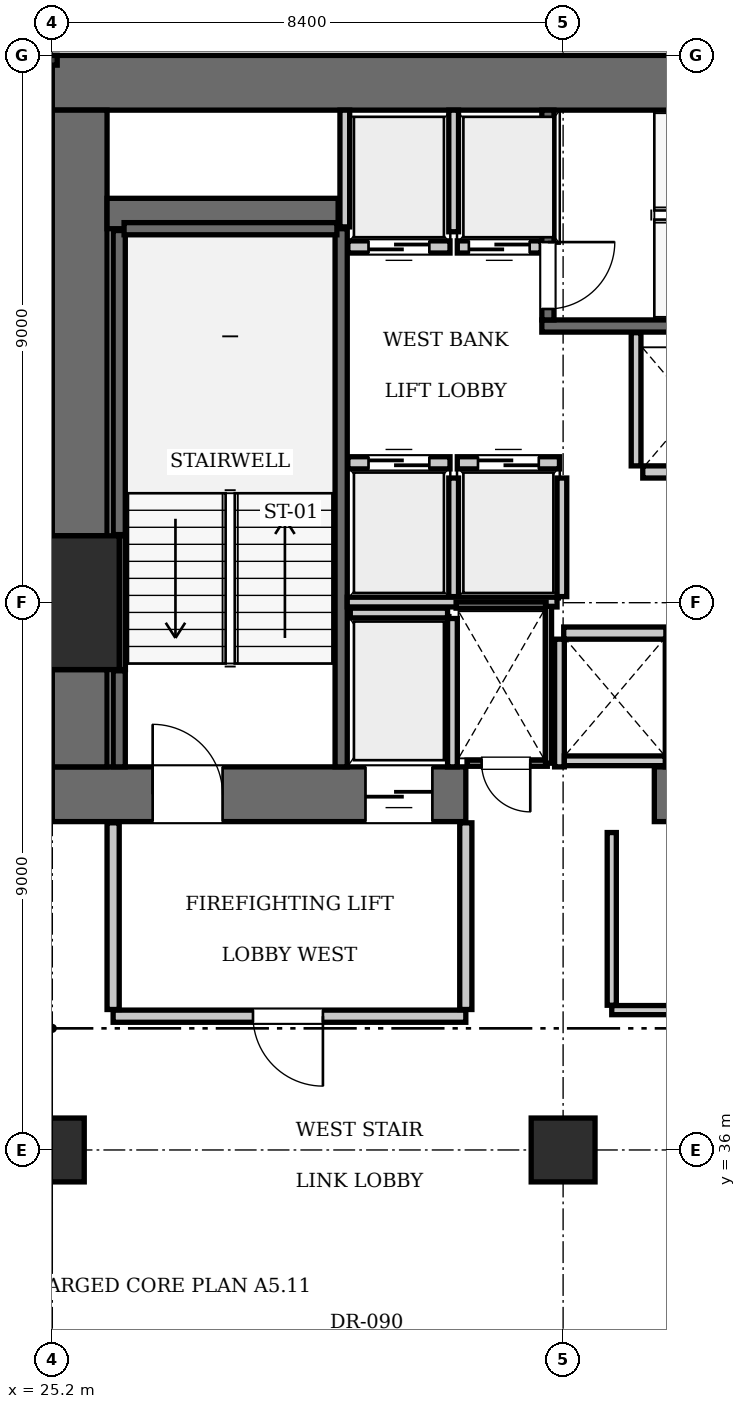
"""IFC4 building model, lengths in metres.
Left out: names, types, materials, properties, quantities, classifications, styles, units other than length and angle.
Written with IfcOpenShell. Run it as: python <this file> out.ifc"""

import sys

from ifc_helpers import new_model, si_unit, direction, frame, frame_2d, origin, origin_2d, place, context, subcontext, project, spatial, rectangle, extrude, element, fill, save


model = new_model("IFC4")
c1 = context("Model", 3, precision=1e-05, world=origin(), true_north=direction((0.0, 1.0)))
c2 = subcontext(c1, "Body", "Model", "MODEL_VIEW")
j1 = project(units=[si_unit("LENGTHUNIT", "METRE"), si_unit("PLANEANGLEUNIT", "RADIAN")], contexts=[c1])
p1 = place(None, origin())
s1 = spatial("IfcSite", under=j1, at=p1, CompositionType="ELEMENT")
p2 = place(p1, origin())
s2 = spatial("IfcBuilding", under=s1, at=p2, CompositionType="ELEMENT")
p3 = place(p2, frame((0.0, 0.0, 38.5)))
s3 = spatial("IfcBuildingStorey", under=s2, at=p3, CompositionType="ELEMENT", Elevation=38.5)
p4 = place(p3, frame((25.2, 45.0, 0.0), z_axis=(0.0, 0.0, 1.0), x_axis=(1.0, 0.0, 0.0)))
e1 = element("IfcColumn", 1, at=p4, inside=s3, PredefinedType="COLUMN", context=c2, shape_type="SweptSolid", body=[
    extrude(rectangle(XDim=2.2, YDim=2.2, at=origin_2d()), origin(), (0.0, 0.0, 1.0), 3.85),
])
p5 = place(p3, frame((25.2, 53.55, 0.0), z_axis=(0.0, 0.0, 1.0), x_axis=(1.0, 0.0, 0.0)))
e2 = element("IfcWall", 2, at=p5, inside=s3, PredefinedType="SHEAR", context=c2, shape_type="SweptSolid", body=[
    extrude(rectangle(XDim=25.2, YDim=0.9, at=frame_2d((12.6, 0.0))), origin(), (0.0, 0.0, 1.0), 3.85),
])
p6 = place(p3, frame((25.2, 41.85, 0.0), z_axis=(0.0, 0.0, 1.0), x_axis=(1.0, 0.0, 0.0)))
e3 = element("IfcWall", 3, at=p6, inside=s3, PredefinedType="SHEAR", context=c2, shape_type="SweptSolid", body=[
    extrude(rectangle(XDim=6.8, YDim=0.9, at=frame_2d((3.4, 0.0))), origin(), (0.0, 0.0, 1.0), 3.85),
])
p7 = place(p6, frame((1.65, 0.0, 0.0)))
e4 = element("IfcOpeningElement", 4, at=p7, cuts=e3, PredefinedType="OPENING", context=c2, shape_type="SweptSolid", body=[
    extrude(rectangle(XDim=1.15, YDim=2.15, at=frame_2d((0.575, 1.075))), frame((0.0, 0.46, 0.0), z_axis=(0.0, -1.0, 0.0), x_axis=(1.0, 0.0, 0.0)), (0.0, 0.0, 1.0), 0.92),
])
p8 = place(p6, frame((5.15, 0.0, 0.0)))
e5 = element("IfcOpeningElement", 5, at=p8, cuts=e3, PredefinedType="OPENING", context=c2, shape_type="SweptSolid", body=[
    extrude(rectangle(XDim=1.1, YDim=2.2, at=frame_2d((0.55, 1.1))), frame((0.0, 0.46, 0.0), z_axis=(0.0, -1.0, 0.0), x_axis=(1.0, 0.0, 0.0)), (0.0, 0.0, 1.0), 0.92),
])
p9 = place(p3, frame((35.1, 41.85, 0.0), z_axis=(0.0, 0.0, 1.0), x_axis=(1.0, 0.0, 0.0)))
e6 = element("IfcWall", 6, at=p9, inside=s3, PredefinedType="SHEAR", context=c2, shape_type="SweptSolid", body=[
    extrude(rectangle(XDim=5.4, YDim=0.9, at=frame_2d((2.7, 0.0))), origin(), (0.0, 0.0, 1.0), 3.85),
])
p10 = place(p3, frame((25.65, 42.3, 0.0), z_axis=(0.0, 0.0, 1.0), x_axis=(0.0, 1.0, 0.0)))
e7 = element("IfcWall", 7, at=p10, inside=s3, PredefinedType="SHEAR", context=c2, shape_type="SweptSolid", body=[
    extrude(rectangle(XDim=1.6, YDim=0.9, at=frame_2d((0.8, 0.0))), origin(), (0.0, 0.0, 1.0), 3.85),
])
p11 = place(p3, frame((25.65, 46.1, 0.0), z_axis=(0.0, 0.0, 1.0), x_axis=(0.0, 1.0, 0.0)))
e8 = element("IfcWall", 8, at=p11, inside=s3, PredefinedType="SHEAR", context=c2, shape_type="SweptSolid", body=[
    extrude(rectangle(XDim=7.0, YDim=0.9, at=frame_2d((3.5, 0.0))), origin(), (0.0, 0.0, 1.0), 3.85),
])
p12 = place(p3, frame((26.1, 51.4, 0.0), z_axis=(0.0, 0.0, 1.0), x_axis=(1.0, 0.0, 0.0)))
e9 = element("IfcWall", 9, at=p12, inside=s3, PredefinedType="SHEAR", context=c2, shape_type="SweptSolid", body=[
    extrude(rectangle(XDim=3.8, YDim=0.5, at=frame_2d((1.9, 0.0))), origin(), (0.0, 0.0, 1.0), 3.85),
])
for number, where, z_axis, x_axis in (
    (10, (25.2, 36.0, 0.0), (0.0, 0.0, 1.0), (1.0, 0.0, 0.0)),
    (11, (33.6, 36.0, 0.0), (0.0, 0.0, 1.0), (1.0, 0.0, 0.0)),
):
    element("IfcColumn", number, at=place(p3, frame(where, z_axis=z_axis, x_axis=x_axis)), inside=s3, PredefinedType="COLUMN", context=c2, shape_type="SweptSolid", body=[
        extrude(rectangle(XDim=1.05, YDim=1.05, at=origin_2d()), origin(), (0.0, 0.0, 1.0), 3.85),
    ])
p13 = place(p3, frame((29.95, 42.3, 0.0), z_axis=(0.0, 0.0, 1.0), x_axis=(0.0, 1.0, 0.0)))
e12 = element("IfcWall", 12, at=p13, inside=s3, PredefinedType="SOLIDWALL", context=c2, shape_type="SweptSolid", body=[
    extrude(rectangle(XDim=8.85, YDim=0.2, at=frame_2d((4.425, 0.0))), origin(), (0.0, 0.0, 1.0), 3.61),
])
p14 = place(p3, frame((26.3, 42.3, 0.0), z_axis=(0.0, 0.0, 1.0), x_axis=(0.0, 1.0, 0.0)))
e13 = element("IfcWall", 13, at=p14, inside=s3, PredefinedType="SOLIDWALL", context=c2, shape_type="SweptSolid", body=[
    extrude(rectangle(XDim=1.58, YDim=0.2, at=frame_2d((0.79, 0.0))), origin(), (0.0, 0.0, 1.0), 3.61),
])
p15 = place(p3, frame((26.3, 46.12, 0.0), z_axis=(0.0, 0.0, 1.0), x_axis=(0.0, 1.0, 0.0)))
e14 = element("IfcWall", 14, at=p15, inside=s3, PredefinedType="SOLIDWALL", context=c2, shape_type="SweptSolid", body=[
    extrude(rectangle(XDim=5.0, YDim=0.2, at=frame_2d((2.5, 0.0))), origin(), (0.0, 0.0, 1.0), 3.61),
])
p16 = place(p3, frame((26.38, 51.15, 0.0), z_axis=(0.0, 0.0, 1.0), x_axis=(1.0, 0.0, 0.0)))
e15 = element("IfcWall", 15, at=p16, inside=s3, PredefinedType="SOLIDWALL", context=c2, shape_type="SweptSolid", body=[
    extrude(rectangle(XDim=3.5, YDim=0.2, at=frame_2d((1.75, 0.0))), origin(), (0.0, 0.0, 1.0), 3.61),
])
p17 = place(p3, frame((26.352, 43.9, 0.0), z_axis=(0.0, 0.0, 1.0), x_axis=(0.0, 1.0, 0.0)))
e16 = element("IfcWall", 16, at=p17, inside=s3, PredefinedType="SOLIDWALL", context=c2, shape_type="SweptSolid", body=[
    extrude(rectangle(XDim=2.2, YDim=0.1, at=frame_2d((1.1, 0.0))), origin(), (0.0, 0.0, 1.0), 3.61),
])
p18 = place(p3, frame((33.25, 49.55, 0.0), z_axis=(0.0, 0.0, 1.0), x_axis=(1.0, 0.0, 0.0)))
e17 = element("IfcWall", 17, at=p18, inside=s3, PredefinedType="SOLIDWALL", context=c2, shape_type="SweptSolid", body=[
    extrude(rectangle(XDim=9.1, YDim=0.2, at=frame_2d((4.55, 0.0))), origin(), (0.0, 0.0, 1.0), 3.61),
])
p19 = place(p3, frame((33.35, 49.65, 0.0), z_axis=(0.0, 0.0, 1.0), x_axis=(0.0, 1.0, 0.0)))
e18 = element("IfcWall", 18, at=p19, inside=s3, PredefinedType="SOLIDWALL", context=c2, shape_type="SweptSolid", body=[
    extrude(rectangle(XDim=3.45, YDim=0.2, at=frame_2d((1.725, 0.0))), origin(), (0.0, 0.0, 1.0), 3.61),
])
p20 = place(p19, frame((0.18, 0.0, 0.0)))
e19 = element("IfcOpeningElement", 19, at=p20, cuts=e18, PredefinedType="OPENING", context=c2, shape_type="SweptSolid", body=[
    extrude(rectangle(XDim=1.1, YDim=2.15, at=frame_2d((0.55, 1.075))), frame((0.0, 0.11, 0.0), z_axis=(0.0, -1.0, 0.0), x_axis=(1.0, 0.0, 0.0)), (0.0, 0.0, 1.0), 0.22),
])
p21 = place(p3, frame((30.06, 47.3, 0.0), z_axis=(0.0, 0.0, 1.0), x_axis=(1.0, 0.0, 0.0)))
e20 = element("IfcWall", 20, at=p21, inside=s3, PredefinedType="SOLIDWALL", context=c2, shape_type="SweptSolid", body=[
    extrude(rectangle(XDim=1.68, YDim=0.2, at=frame_2d((0.84, 0.0))), origin(), (0.0, 0.0, 1.0), 3.61),
])
p22 = place(p21, frame((0.34, 0.0, 0.0)))
e21 = element("IfcOpeningElement", 21, at=p22, cuts=e20, PredefinedType="OPENING", context=c2, shape_type="SweptSolid", body=[
    extrude(rectangle(XDim=1.0, YDim=2.15, at=frame_2d((0.5, 1.075))), frame((0.0, 0.11, 0.0), z_axis=(0.0, -1.0, 0.0), x_axis=(1.0, 0.0, 0.0)), (0.0, 0.0, 1.0), 0.22),
])
p23 = place(p3, frame((31.86, 47.3, 0.0), z_axis=(0.0, 0.0, 1.0), x_axis=(1.0, 0.0, 0.0)))
e22 = element("IfcWall", 22, at=p23, inside=s3, PredefinedType="SOLIDWALL", context=c2, shape_type="SweptSolid", body=[
    extrude(rectangle(XDim=1.68, YDim=0.2, at=frame_2d((0.84, 0.0))), origin(), (0.0, 0.0, 1.0), 3.61),
])
p24 = place(p23, frame((0.34, 0.0, 0.0)))
e23 = element("IfcOpeningElement", 23, at=p24, cuts=e22, PredefinedType="OPENING", context=c2, shape_type="SweptSolid", body=[
    extrude(rectangle(XDim=1.0, YDim=2.15, at=frame_2d((0.5, 1.075))), frame((0.0, 0.11, 0.0), z_axis=(0.0, -1.0, 0.0), x_axis=(1.0, 0.0, 0.0)), (0.0, 0.0, 1.0), 0.22),
])
p25 = place(p3, frame((30.06, 50.85, 0.0), z_axis=(0.0, 0.0, 1.0), x_axis=(1.0, 0.0, 0.0)))
e24 = element("IfcWall", 24, at=p25, inside=s3, PredefinedType="SOLIDWALL", context=c2, shape_type="SweptSolid", body=[
    extrude(rectangle(XDim=1.68, YDim=0.2, at=frame_2d((0.84, 0.0))), origin(), (0.0, 0.0, 1.0), 3.61),
])
p26 = place(p25, frame((0.34, 0.0, 0.0)))
e25 = element("IfcOpeningElement", 25, at=p26, cuts=e24, PredefinedType="OPENING", context=c2, shape_type="SweptSolid", body=[
    extrude(rectangle(XDim=1.0, YDim=2.15, at=frame_2d((0.5, 1.075))), frame((0.0, 0.11, 0.0), z_axis=(0.0, -1.0, 0.0), x_axis=(1.0, 0.0, 0.0)), (0.0, 0.0, 1.0), 0.22),
])
p27 = place(p3, frame((31.86, 50.85, 0.0), z_axis=(0.0, 0.0, 1.0), x_axis=(1.0, 0.0, 0.0)))
e26 = element("IfcWall", 26, at=p27, inside=s3, PredefinedType="SOLIDWALL", context=c2, shape_type="SweptSolid", body=[
    extrude(rectangle(XDim=1.38, YDim=0.2, at=frame_2d((0.69, 0.0))), origin(), (0.0, 0.0, 1.0), 3.61),
])
p28 = place(p27, frame((0.19, 0.0, 0.0)))
e27 = element("IfcOpeningElement", 27, at=p28, cuts=e26, PredefinedType="OPENING", context=c2, shape_type="SweptSolid", body=[
    extrude(rectangle(XDim=1.0, YDim=2.15, at=frame_2d((0.5, 1.075))), frame((0.0, 0.11, 0.0), z_axis=(0.0, -1.0, 0.0), x_axis=(1.0, 0.0, 0.0)), (0.0, 0.0, 1.0), 0.22),
])
p29 = place(p3, frame((34.91, 47.15, 0.0), z_axis=(0.0, 0.0, 1.0), x_axis=(1.0, 0.0, 0.0)))
e28 = element("IfcWall", 28, at=p29, inside=s3, PredefinedType="SOLIDWALL", context=c2, shape_type="SweptSolid", body=[
    extrude(rectangle(XDim=1.68, YDim=0.2, at=frame_2d((0.84, 0.0))), origin(), (0.0, 0.0, 1.0), 3.61),
])
p30 = place(p3, frame((33.61, 44.5, 0.0), z_axis=(0.0, 0.0, 1.0), x_axis=(1.0, 0.0, 0.0)))
e29 = element("IfcWall", 29, at=p30, inside=s3, PredefinedType="SOLIDWALL", context=c2, shape_type="SweptSolid", body=[
    extrude(rectangle(XDim=1.68, YDim=0.2, at=frame_2d((0.84, 0.0))), origin(), (0.0, 0.0, 1.0), 3.61),
])
p31 = place(p3, frame((30.1, 44.83, 0.0), z_axis=(0.0, 0.0, 1.0), x_axis=(1.0, 0.0, 0.0)))
e30 = element("IfcWall", 30, at=p31, inside=s3, PredefinedType="SOLIDWALL", context=c2, shape_type="SweptSolid", body=[
    extrude(rectangle(XDim=1.6, YDim=0.16, at=frame_2d((0.8, 0.0))), origin(), (0.0, 0.0, 1.0), 3.61),
])
p32 = place(p3, frame((31.78, 42.3, 0.0), z_axis=(0.0, 0.0, 1.0), x_axis=(0.0, 1.0, 0.0)))
e31 = element("IfcWall", 31, at=p32, inside=s3, PredefinedType="SOLIDWALL", context=c2, shape_type="SweptSolid", body=[
    extrude(rectangle(XDim=2.44, YDim=0.16, at=frame_2d((1.22, 0.0))), origin(), (0.0, 0.0, 1.0), 3.61),
])
for number, where, z_axis, x_axis in (
    (32, (31.8, 45.1, 0.0), (0.0, 0.0, 1.0), (0.0, 1.0, 0.0)),
    (33, (33.58, 45.1, 0.0), (0.0, 0.0, 1.0), (0.0, 1.0, 0.0)),
):
    element("IfcWall", number, at=place(p3, frame(where, z_axis=z_axis, x_axis=x_axis)), inside=s3, PredefinedType="SOLIDWALL", context=c2, shape_type="SweptSolid", body=[
        extrude(rectangle(XDim=1.95, YDim=0.16, at=frame_2d((0.975, 0.0))), origin(), (0.0, 0.0, 1.0), 3.61),
    ])
p33 = place(p3, frame((30.05, 45.01, 0.0), z_axis=(0.0, 0.0, 1.0), x_axis=(1.0, 0.0, 0.0)))
e34 = element("IfcWall", 34, at=p33, inside=s3, PredefinedType="SOLIDWALL", context=c2, shape_type="SweptSolid", body=[
    extrude(rectangle(XDim=3.45, YDim=0.16, at=frame_2d((1.725, 0.0))), origin(), (0.0, 0.0, 1.0), 3.61),
])
p34 = place(p3, frame((30.01, 51.18, 0.0), z_axis=(0.0, 0.0, 1.0), x_axis=(0.0, 1.0, 0.0)))
e35 = element("IfcWall", 35, at=p34, inside=s3, PredefinedType="SOLIDWALL", context=c2, shape_type="SweptSolid", body=[
    extrude(rectangle(XDim=1.92, YDim=0.16, at=frame_2d((0.96, 0.0))), origin(), (0.0, 0.0, 1.0), 3.61),
])
p35 = place(p3, frame((31.8, 51.1, 0.0), z_axis=(0.0, 0.0, 1.0), x_axis=(0.0, 1.0, 0.0)))
e36 = element("IfcWall", 36, at=p35, inside=s3, PredefinedType="SOLIDWALL", context=c2, shape_type="SweptSolid", body=[
    extrude(rectangle(XDim=2.0, YDim=0.16, at=frame_2d((1.0, 0.0))), origin(), (0.0, 0.0, 1.0), 3.61),
])
p36 = place(p3, frame((34.8, 47.25, 0.0), z_axis=(0.0, 0.0, 1.0), x_axis=(0.0, 1.0, 0.0)))
e37 = element("IfcWall", 37, at=p36, inside=s3, PredefinedType="SOLIDWALL", context=c2, shape_type="SweptSolid", body=[
    extrude(rectangle(XDim=2.19, YDim=0.16, at=frame_2d((1.095, 0.0))), origin(), (0.0, 0.0, 1.0), 3.61),
])
for number, where, z_axis, x_axis in (
    (38, (33.54, 42.3, 0.0), (0.0, 0.0, 1.0), (0.0, 1.0, 0.0)),
    (39, (35.36, 42.3, 0.0), (0.0, 0.0, 1.0), (0.0, 1.0, 0.0)),
):
    element("IfcWall", number, at=place(p3, frame(where, z_axis=z_axis, x_axis=x_axis)), inside=s3, PredefinedType="SOLIDWALL", context=c2, shape_type="SweptSolid", body=[
        extrude(rectangle(XDim=2.1, YDim=0.16, at=frame_2d((1.05, 0.0))), origin(), (0.0, 0.0, 1.0), 3.61),
    ])
p37 = place(p3, frame((33.62, 42.4, 0.0), z_axis=(0.0, 0.0, 1.0), x_axis=(1.0, 0.0, 0.0)))
e40 = element("IfcWall", 40, at=p37, inside=s3, PredefinedType="SOLIDWALL", context=c2, shape_type="SweptSolid", body=[
    extrude(rectangle(XDim=1.66, YDim=0.16, at=frame_2d((0.83, 0.0))), origin(), (0.0, 0.0, 1.0), 3.61),
])
p38 = place(p3, frame((26.2, 38.2, 0.0), z_axis=(0.0, 0.0, 1.0), x_axis=(1.0, 0.0, 0.0)))
e41 = element("IfcWall", 41, at=p38, inside=s3, PredefinedType="PARTITIONING", context=c2, shape_type="SweptSolid", body=[
    extrude(rectangle(XDim=5.8, YDim=0.2, at=frame_2d((2.9, 0.0))), origin(), (0.0, 0.0, 1.0), 3.61),
])
p39 = place(p38, frame((2.3, 0.0, 0.0)))
e42 = element("IfcOpeningElement", 42, at=p39, cuts=e41, PredefinedType="OPENING", context=c2, shape_type="SweptSolid", body=[
    extrude(rectangle(XDim=1.15, YDim=2.15, at=frame_2d((0.575, 1.075))), frame((0.0, 0.11, 0.0), z_axis=(0.0, -1.0, 0.0), x_axis=(1.0, 0.0, 0.0)), (0.0, 0.0, 1.0), 0.22),
])
for number, where, z_axis, x_axis in (
    (43, (26.2, 38.31, 0.0), (0.0, 0.0, 1.0), (0.0, 1.0, 0.0)),
    (44, (32.0, 38.31, 0.0), (0.0, 0.0, 1.0), (0.0, 1.0, 0.0)),
):
    element("IfcWall", number, at=place(p3, frame(where, z_axis=z_axis, x_axis=x_axis)), inside=s3, PredefinedType="PARTITIONING", context=c2, shape_type="SweptSolid", body=[
        extrude(rectangle(XDim=3.07, YDim=0.2, at=frame_2d((1.535, 0.0))), origin(), (0.0, 0.0, 1.0), 3.61),
    ])
p40 = place(p3, frame((32.02, 42.36, 0.0), z_axis=(0.0, 0.0, 1.0), x_axis=(1.0, 0.0, 0.0)))
e45 = element("IfcWall", 45, at=p40, inside=s3, PredefinedType="PARTITIONING", context=c2, shape_type="SweptSolid", body=[
    extrude(rectangle(XDim=1.32, YDim=0.1, at=frame_2d((0.66, 0.0))), origin(), (0.0, 0.0, 1.0), 3.61),
])
p41 = place(p40, frame((0.24, 0.0, 0.0)))
e46 = element("IfcOpeningElement", 46, at=p41, cuts=e45, PredefinedType="OPENING", context=c2, shape_type="SweptSolid", body=[
    extrude(rectangle(XDim=0.8, YDim=2.05, at=frame_2d((0.4, 1.025))), frame((0.0, 0.06, 0.0), z_axis=(0.0, -1.0, 0.0), x_axis=(1.0, 0.0, 0.0)), (0.0, 0.0, 1.0), 0.12),
])
p42 = place(p3, frame((31.84, 44.96, 0.0), z_axis=(0.0, 0.0, 1.0), x_axis=(1.0, 0.0, 0.0)))
e47 = element("IfcWall", 47, at=p42, inside=s3, PredefinedType="PARTITIONING", context=c2, shape_type="SweptSolid", body=[
    extrude(rectangle(XDim=1.48, YDim=0.1, at=frame_2d((0.74, 0.0))), origin(), (0.0, 0.0, 1.0), 3.61),
])
p43 = place(p3, frame((33.36, 42.36, 0.0), z_axis=(0.0, 0.0, 1.0), x_axis=(0.0, 1.0, 0.0)))
e48 = element("IfcWall", 48, at=p43, inside=s3, PredefinedType="PARTITIONING", context=c2, shape_type="SweptSolid", body=[
    extrude(rectangle(XDim=2.58, YDim=0.1, at=frame_2d((1.29, 0.0))), origin(), (0.0, 0.0, 1.0), 3.61),
])
p44 = place(p3, frame((34.4, 38.3, 0.0), z_axis=(0.0, 0.0, 1.0), x_axis=(1.0, 0.0, 0.0)))
e49 = element("IfcWall", 49, at=p44, inside=s3, PredefinedType="PARTITIONING", context=c2, shape_type="SweptSolid", body=[
    extrude(rectangle(XDim=2.88, YDim=0.15, at=frame_2d((1.44, 0.0))), origin(), (0.0, 0.0, 1.0), 3.61),
])
p45 = place(p44, frame((1.0, 0.0, 0.0)))
e50 = element("IfcOpeningElement", 50, at=p45, cuts=e49, PredefinedType="OPENING", context=c2, shape_type="SweptSolid", body=[
    extrude(rectangle(XDim=0.8, YDim=2.05, at=frame_2d((0.4, 1.025))), frame((0.0, 0.085, 0.0), z_axis=(0.0, -1.0, 0.0), x_axis=(1.0, 0.0, 0.0)), (0.0, 0.0, 1.0), 0.17),
])
p46 = place(p3, frame((34.4, 38.38, 0.0), z_axis=(0.0, 0.0, 1.0), x_axis=(0.0, 1.0, 0.0)))
e51 = element("IfcWall", 51, at=p46, inside=s3, PredefinedType="PARTITIONING", context=c2, shape_type="SweptSolid", body=[
    extrude(rectangle(XDim=2.84, YDim=0.15, at=frame_2d((1.42, 0.0))), origin(), (0.0, 0.0, 1.0), 3.61),
])
p47 = place(p7, origin())
e52 = element("IfcDoor", 52, at=p47, inside=s3, OperationType="SINGLE_SWING_LEFT", PredefinedType="DOOR", context=c2, shape_type="SweptSolid", body=[
    extrude(rectangle(XDim=1.15, YDim=2.15, at=frame_2d((0.575, 1.075))), frame((0.0, 0.025, 0.0), z_axis=(0.0, -1.0, 0.0), x_axis=(1.0, 0.0, 0.0)), (0.0, 0.0, 1.0), 0.05),
])
fill(e4, e52)
p48 = place(p20, frame((1.1, 0.0, 0.0), z_axis=(0.0, 0.0, 1.0), x_axis=(-1.0, 0.0, 0.0)))
e53 = element("IfcDoor", 53, at=p48, inside=s3, OperationType="SINGLE_SWING_LEFT", PredefinedType="DOOR", context=c2, shape_type="SweptSolid", body=[
    extrude(rectangle(XDim=1.1, YDim=2.15, at=frame_2d((0.55, 1.075))), frame((0.0, 0.025, 0.0), z_axis=(0.0, -1.0, 0.0), x_axis=(1.0, 0.0, 0.0)), (0.0, 0.0, 1.0), 0.05),
])
fill(e19, e53)
p49 = place(p22, origin())
e54 = element("IfcDoor", 54, at=p49, inside=s3, OperationType="SLIDING_TO_LEFT", PredefinedType="DOOR", context=c2, shape_type="SweptSolid", body=[
    extrude(rectangle(XDim=1.0, YDim=2.15, at=frame_2d((0.5, 1.075))), frame((0.0, 0.025, 0.0), z_axis=(0.0, -1.0, 0.0), x_axis=(1.0, 0.0, 0.0)), (0.0, 0.0, 1.0), 0.05),
])
fill(e21, e54)
p50 = place(p24, origin())
e55 = element("IfcDoor", 55, at=p50, inside=s3, OperationType="SLIDING_TO_LEFT", PredefinedType="DOOR", context=c2, shape_type="SweptSolid", body=[
    extrude(rectangle(XDim=1.0, YDim=2.15, at=frame_2d((0.5, 1.075))), frame((0.0, 0.025, 0.0), z_axis=(0.0, -1.0, 0.0), x_axis=(1.0, 0.0, 0.0)), (0.0, 0.0, 1.0), 0.05),
])
fill(e23, e55)
p51 = place(p26, frame((1.0, 0.0, 0.0), z_axis=(0.0, 0.0, 1.0), x_axis=(-1.0, 0.0, 0.0)))
e56 = element("IfcDoor", 56, at=p51, inside=s3, OperationType="SLIDING_TO_LEFT", PredefinedType="DOOR", context=c2, shape_type="SweptSolid", body=[
    extrude(rectangle(XDim=1.0, YDim=2.15, at=frame_2d((0.5, 1.075))), frame((0.0, 0.025, 0.0), z_axis=(0.0, -1.0, 0.0), x_axis=(1.0, 0.0, 0.0)), (0.0, 0.0, 1.0), 0.05),
])
fill(e25, e56)
p52 = place(p28, frame((1.0, 0.0, 0.0), z_axis=(0.0, 0.0, 1.0), x_axis=(-1.0, 0.0, 0.0)))
e57 = element("IfcDoor", 57, at=p52, inside=s3, OperationType="SLIDING_TO_LEFT", PredefinedType="DOOR", context=c2, shape_type="SweptSolid", body=[
    extrude(rectangle(XDim=1.0, YDim=2.15, at=frame_2d((0.5, 1.075))), frame((0.0, 0.025, 0.0), z_axis=(0.0, -1.0, 0.0), x_axis=(1.0, 0.0, 0.0)), (0.0, 0.0, 1.0), 0.05),
])
fill(e27, e57)
p53 = place(p8, frame((1.1, 0.0, 0.0), z_axis=(0.0, 0.0, 1.0), x_axis=(-1.0, 0.0, 0.0)))
e58 = element("IfcDoor", 58, at=p53, inside=s3, OperationType="SLIDING_TO_LEFT", PredefinedType="DOOR", context=c2, shape_type="SweptSolid", body=[
    extrude(rectangle(XDim=1.1, YDim=2.2, at=frame_2d((0.55, 1.1))), frame((0.0, 0.025, 0.0), z_axis=(0.0, -1.0, 0.0), x_axis=(1.0, 0.0, 0.0)), (0.0, 0.0, 1.0), 0.05),
])
fill(e5, e58)
p54 = place(p39, frame((1.15, 0.0, 0.0), z_axis=(0.0, 0.0, 1.0), x_axis=(-1.0, 0.0, 0.0)))
e59 = element("IfcDoor", 59, at=p54, inside=s3, OperationType="SINGLE_SWING_LEFT", PredefinedType="DOOR", context=c2, shape_type="SweptSolid", body=[
    extrude(rectangle(XDim=1.15, YDim=2.15, at=frame_2d((0.575, 1.075))), frame((0.0, 0.025, 0.0), z_axis=(0.0, -1.0, 0.0), x_axis=(1.0, 0.0, 0.0)), (0.0, 0.0, 1.0), 0.05),
])
fill(e42, e59)
p55 = place(p41, frame((0.8, 0.0, 0.0), z_axis=(0.0, 0.0, 1.0), x_axis=(-1.0, 0.0, 0.0)))
e60 = element("IfcDoor", 60, at=p55, inside=s3, OperationType="SINGLE_SWING_LEFT", PredefinedType="DOOR", context=c2, shape_type="SweptSolid", body=[
    extrude(rectangle(XDim=0.8, YDim=2.05, at=frame_2d((0.4, 1.025))), frame((0.0, 0.025, 0.0), z_axis=(0.0, -1.0, 0.0), x_axis=(1.0, 0.0, 0.0)), (0.0, 0.0, 1.0), 0.05),
])
fill(e46, e60)
save(model, sys.argv[1])
